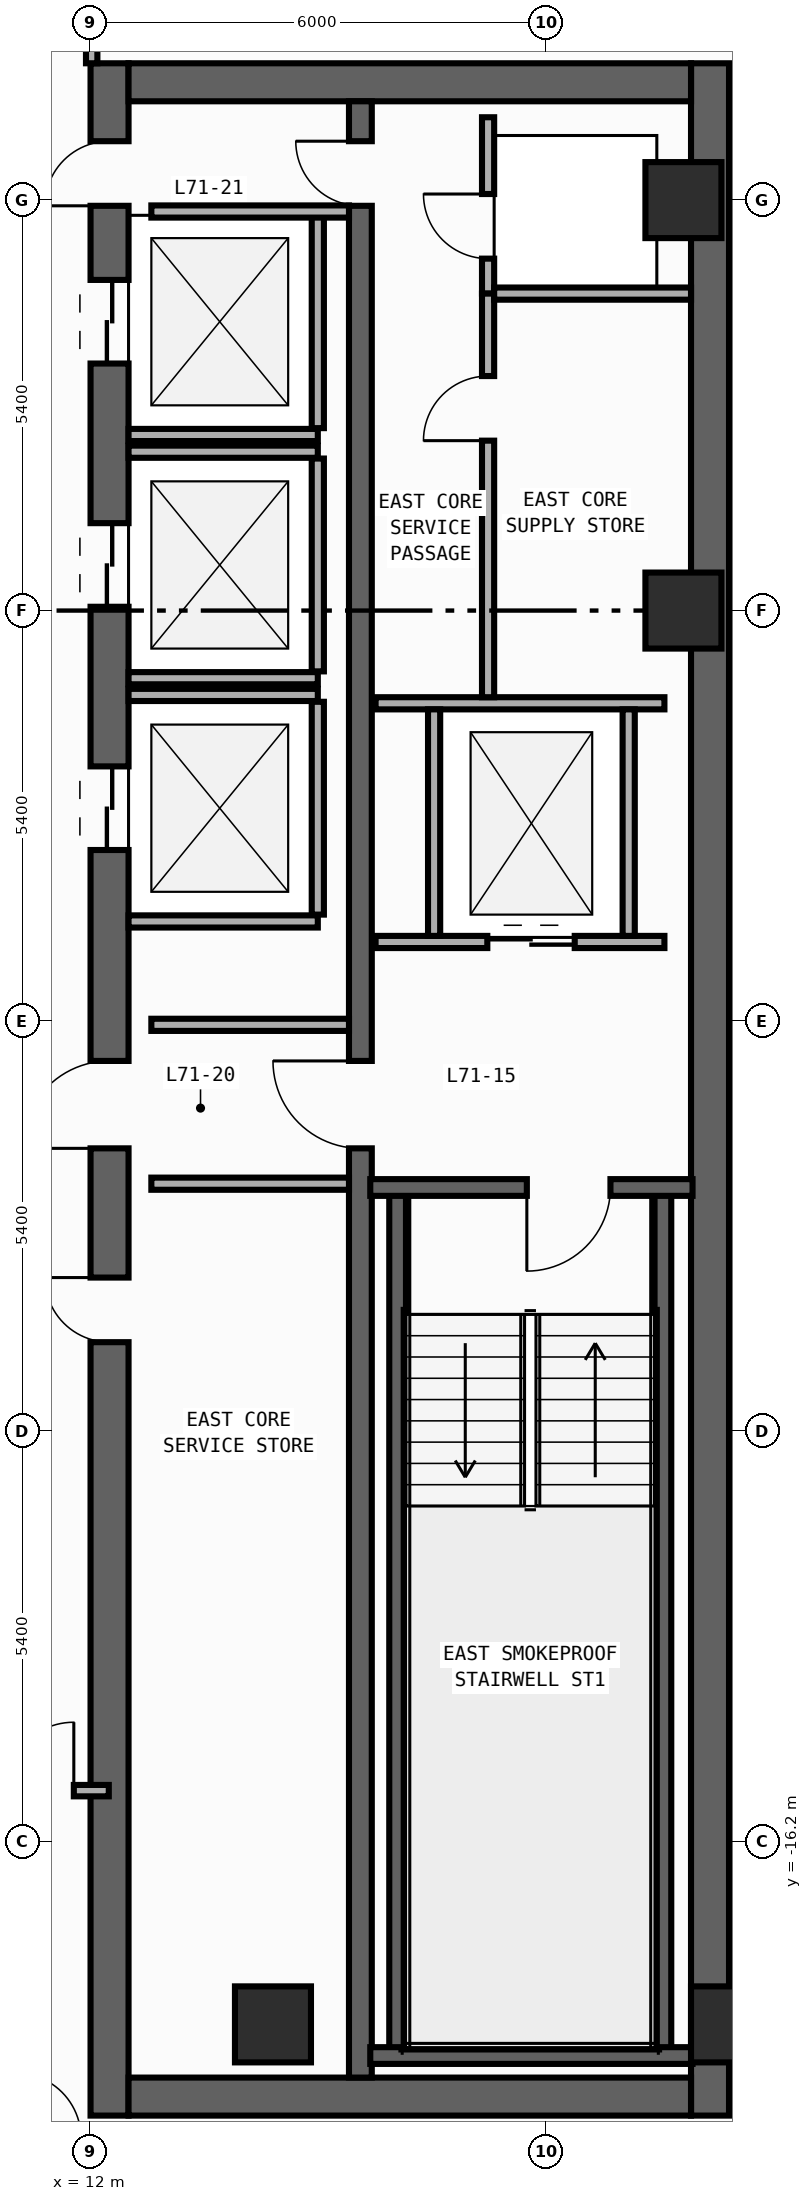
"""IFC4 building model, lengths in metres.
Left out: names, types, materials, properties, quantities, classifications, styles, units other than length and angle.
Written with IfcOpenShell. Run it as: python <this file> out.ifc"""

import sys

from ifc_helpers import new_model, si_unit, direction, frame, frame_2d, origin, origin_2d, place, context, subcontext, project, spatial, rectangle, circle, extrude, element, fill, save


model = new_model("IFC4")
c1 = context("Model", 3, precision=1e-05, world=origin(), true_north=direction((0.0, 1.0)))
c2 = subcontext(c1, "Body", "Model", "MODEL_VIEW")
j1 = project(units=[si_unit("LENGTHUNIT", "METRE"), si_unit("PLANEANGLEUNIT", "RADIAN")], contexts=[c1])
p1 = place(None, origin())
s1 = spatial("IfcSite", under=j1, at=p1, CompositionType="ELEMENT")
p2 = place(p1, origin())
s2 = spatial("IfcBuilding", under=s1, at=p2, CompositionType="ELEMENT")
p3 = place(p2, frame((0.0, 0.0, 296.6)))
s3 = spatial("IfcBuildingStorey", under=s2, at=p3, CompositionType="ELEMENT", Elevation=296.6)
p4 = place(p3, frame((12.25, -19.8, 0.0), z_axis=(0.0, 0.0, 1.0), x_axis=(0.0, 1.0, 0.0)))
e1 = element("IfcWall", 1, at=p4, inside=s3, PredefinedType="SHEAR", context=c2, shape_type="SweptSolid", body=[
    extrude(rectangle(XDim=27.0, YDim=0.5, at=frame_2d((13.5, 0.0))), origin(), (0.0, 0.0, 1.0), 3.54),
])
p5 = place(p4, frame((23.05, 0.0, 0.0)))
e2 = element("IfcOpeningElement", 2, at=p5, cuts=e1, PredefinedType="OPENING", context=c2, shape_type="SweptSolid", body=[
    extrude(rectangle(XDim=1.1, YDim=2.2, at=frame_2d((0.55, 1.1))), frame((0.0, 0.26, 0.0), z_axis=(0.0, -1.0, 0.0), x_axis=(1.0, 0.0, 0.0)), (0.0, 0.0, 1.0), 0.52),
])
p6 = place(p4, frame((19.85, 0.0, 0.0)))
e3 = element("IfcOpeningElement", 3, at=p6, cuts=e1, PredefinedType="OPENING", context=c2, shape_type="SweptSolid", body=[
    extrude(rectangle(XDim=1.1, YDim=2.2, at=frame_2d((0.55, 1.1))), frame((0.0, 0.26, 0.0), z_axis=(0.0, -1.0, 0.0), x_axis=(1.0, 0.0, 0.0)), (0.0, 0.0, 1.0), 0.52),
])
p7 = place(p4, frame((16.65, 0.0, 0.0)))
e4 = element("IfcOpeningElement", 4, at=p7, cuts=e1, PredefinedType="OPENING", context=c2, shape_type="SweptSolid", body=[
    extrude(rectangle(XDim=1.1, YDim=2.2, at=frame_2d((0.55, 1.1))), frame((0.0, 0.26, 0.0), z_axis=(0.0, -1.0, 0.0), x_axis=(1.0, 0.0, 0.0)), (0.0, 0.0, 1.0), 0.52),
])
p8 = place(p4, frame((10.175, 0.0, 0.0)))
e5 = element("IfcOpeningElement", 5, at=p8, cuts=e1, PredefinedType="OPENING", context=c2, shape_type="SweptSolid", body=[
    extrude(rectangle(XDim=0.85, YDim=2.1, at=frame_2d((0.425, 1.05))), frame((0.0, 0.26, 0.0), z_axis=(0.0, -1.0, 0.0), x_axis=(1.0, 0.0, 0.0)), (0.0, 0.0, 1.0), 0.52),
])
p9 = place(p4, frame((12.725, 0.0, 0.0)))
e6 = element("IfcOpeningElement", 6, at=p9, cuts=e1, PredefinedType="OPENING", context=c2, shape_type="SweptSolid", body=[
    extrude(rectangle(XDim=1.15, YDim=2.2, at=frame_2d((0.575, 1.1))), frame((0.0, 0.26, 0.0), z_axis=(0.0, -1.0, 0.0), x_axis=(1.0, 0.0, 0.0)), (0.0, 0.0, 1.0), 0.52),
])
p10 = place(p4, frame((25.125, 0.0, 0.0)))
e7 = element("IfcOpeningElement", 7, at=p10, cuts=e1, PredefinedType="OPENING", context=c2, shape_type="SweptSolid", body=[
    extrude(rectangle(XDim=0.85, YDim=2.1, at=frame_2d((0.425, 1.05))), frame((0.0, 0.26, 0.0), z_axis=(0.0, -1.0, 0.0), x_axis=(1.0, 0.0, 0.0)), (0.0, 0.0, 1.0), 0.52),
])
p11 = place(p3, frame((20.15, -19.8, 0.0), z_axis=(0.0, 0.0, 1.0), x_axis=(0.0, 1.0, 0.0)))
e8 = element("IfcWall", 8, at=p11, inside=s3, PredefinedType="SHEAR", context=c2, shape_type="SweptSolid", body=[
    extrude(rectangle(XDim=27.0, YDim=0.5, at=frame_2d((13.5, 0.0))), origin(), (0.0, 0.0, 1.0), 3.54),
])
for number, where, z_axis, x_axis in (
    (9, (12.5, -19.55, 0.0), (0.0, 0.0, 1.0), (1.0, 0.0, 0.0)),
    (10, (12.5, 6.95, 0.0), (0.0, 0.0, 1.0), (1.0, 0.0, 0.0)),
):
    element("IfcWall", number, at=place(p3, frame(where, z_axis=z_axis, x_axis=x_axis)), inside=s3, PredefinedType="SHEAR", context=c2, shape_type="SweptSolid", body=[
        extrude(rectangle(XDim=7.4, YDim=0.5, at=frame_2d((3.7, 0.0))), origin(), (0.0, 0.0, 1.0), 3.54),
    ])
p12 = place(p3, frame((15.55, -19.3, 0.0), z_axis=(0.0, 0.0, 1.0), x_axis=(0.0, 1.0, 0.0)))
e11 = element("IfcWall", 11, at=p12, inside=s3, PredefinedType="SHEAR", context=c2, shape_type="SweptSolid", body=[
    extrude(rectangle(XDim=26.0, YDim=0.3, at=frame_2d((13.0, 0.0))), origin(), (0.0, 0.0, 1.0), 3.54),
])
p13 = place(p12, frame((12.225, 0.0, 0.0)))
e12 = element("IfcOpeningElement", 12, at=p13, cuts=e11, PredefinedType="OPENING", context=c2, shape_type="SweptSolid", body=[
    extrude(rectangle(XDim=1.15, YDim=2.2, at=frame_2d((0.575, 1.1))), frame((0.0, 0.16, 0.0), z_axis=(0.0, -1.0, 0.0), x_axis=(1.0, 0.0, 0.0)), (0.0, 0.0, 1.0), 0.32),
])
p14 = place(p12, frame((24.625, 0.0, 0.0)))
e13 = element("IfcOpeningElement", 13, at=p14, cuts=e11, PredefinedType="OPENING", context=c2, shape_type="SweptSolid", body=[
    extrude(rectangle(XDim=0.85, YDim=2.1, at=frame_2d((0.425, 1.05))), frame((0.0, 0.16, 0.0), z_axis=(0.0, -1.0, 0.0), x_axis=(1.0, 0.0, 0.0)), (0.0, 0.0, 1.0), 0.32),
])
for number, where, z_axis, x_axis in (
    (14, (16.04, -19.01, 0.0), (0.0, 0.0, 1.0), (0.0, 1.0, 0.0)),
    (15, (19.53, -19.01, 0.0), (0.0, 0.0, 1.0), (0.0, 1.0, 0.0)),
):
    element("IfcWall", number, at=place(p3, frame(where, z_axis=z_axis, x_axis=x_axis)), inside=s3, PredefinedType="SHEAR", context=c2, shape_type="SweptSolid", body=[
        extrude(rectangle(XDim=11.42, YDim=0.22, at=frame_2d((5.71, 0.0))), origin(), (0.0, 0.0, 1.0), 3.54),
    ])
p15 = place(p3, frame((15.68, -19.01, 0.0), z_axis=(0.0, 0.0, 1.0), x_axis=(1.0, 0.0, 0.0)))
e16 = element("IfcWall", 16, at=p15, inside=s3, PredefinedType="SHEAR", context=c2, shape_type="SweptSolid", body=[
    extrude(rectangle(XDim=4.24, YDim=0.22, at=frame_2d((2.12, 0.0))), origin(), (0.0, 0.0, 1.0), 3.54),
])
p16 = place(p3, frame((19.92, -7.59, 0.0), z_axis=(0.0, 0.0, 1.0), x_axis=(-1.0, 0.0, 0.0)))
e17 = element("IfcWall", 17, at=p16, inside=s3, PredefinedType="SHEAR", context=c2, shape_type="SweptSolid", body=[
    extrude(rectangle(XDim=4.24, YDim=0.22, at=frame_2d((2.12, 0.0))), origin(), (0.0, 0.0, 1.0), 3.54),
])
p17 = place(p16, frame((1.08, 0.0, 0.0)))
e18 = element("IfcOpeningElement", 18, at=p17, cuts=e17, PredefinedType="OPENING", context=c2, shape_type="SweptSolid", body=[
    extrude(rectangle(XDim=1.1, YDim=2.2, at=frame_2d((0.55, 1.1))), frame((0.0, 0.12, 0.0), z_axis=(0.0, -1.0, 0.0), x_axis=(1.0, 0.0, 0.0)), (0.0, 0.0, 1.0), 0.24),
])
for number, where, z_axis, x_axis in (
    (19, (20.4, -18.6, 0.0), (0.0, 0.0, 1.0), (1.0, 0.0, 0.0)),
    (20, (14.4, -18.6, 0.0), (0.0, 0.0, 1.0), (1.0, 0.0, 0.0)),
    (21, (19.8, 0.0, 0.0), (0.0, 0.0, 1.0), (1.0, 0.0, 0.0)),
    (22, (19.8, 5.4, 0.0), (0.0, 0.0, 1.0), (1.0, 0.0, 0.0)),
):
    element("IfcColumn", number, at=place(p3, frame(where, z_axis=z_axis, x_axis=x_axis)), inside=s3, PredefinedType="COLUMN", context=c2, shape_type="SweptSolid", body=[
        extrude(circle(Radius=0.5, at=origin_2d()), origin(), (0.0, 0.0, 1.0), 3.8),
    ])
p18 = place(p3, frame((12.5, 2.31, 0.0), z_axis=(0.0, 0.0, 1.0), x_axis=(1.0, 0.0, 0.0)))
e23 = element("IfcWall", 23, at=p18, inside=s3, PredefinedType="STANDARD", context=c2, shape_type="SweptSolid", body=[
    extrude(rectangle(XDim=2.49, YDim=0.16, at=frame_2d((1.245, 0.0))), origin(), (0.0, 0.0, 1.0), 3.54),
])
p19 = place(p3, frame((14.99, 2.4, 0.0), z_axis=(0.0, 0.0, 1.0), x_axis=(0.0, 1.0, 0.0)))
e24 = element("IfcWall", 24, at=p19, inside=s3, PredefinedType="STANDARD", context=c2, shape_type="SweptSolid", body=[
    extrude(rectangle(XDim=2.8, YDim=0.16, at=frame_2d((1.4, 0.0))), origin(), (0.0, 0.0, 1.0), 3.54),
])
for number, where, z_axis, x_axis in (
    (25, (12.5, -0.89, 0.0), (0.0, 0.0, 1.0), (1.0, 0.0, 0.0)),
    (26, (12.5, 2.09, 0.0), (0.0, 0.0, 1.0), (1.0, 0.0, 0.0)),
):
    element("IfcWall", number, at=place(p3, frame(where, z_axis=z_axis, x_axis=x_axis)), inside=s3, PredefinedType="STANDARD", context=c2, shape_type="SweptSolid", body=[
        extrude(rectangle(XDim=2.49, YDim=0.16, at=frame_2d((1.245, 0.0))), origin(), (0.0, 0.0, 1.0), 3.54),
    ])
p20 = place(p3, frame((14.99, -0.8, 0.0), z_axis=(0.0, 0.0, 1.0), x_axis=(0.0, 1.0, 0.0)))
e27 = element("IfcWall", 27, at=p20, inside=s3, PredefinedType="STANDARD", context=c2, shape_type="SweptSolid", body=[
    extrude(rectangle(XDim=2.8, YDim=0.16, at=frame_2d((1.4, 0.0))), origin(), (0.0, 0.0, 1.0), 3.54),
])
for number, where, z_axis, x_axis in (
    (28, (12.5, -4.09, 0.0), (0.0, 0.0, 1.0), (1.0, 0.0, 0.0)),
    (29, (12.5, -1.11, 0.0), (0.0, 0.0, 1.0), (1.0, 0.0, 0.0)),
):
    element("IfcWall", number, at=place(p3, frame(where, z_axis=z_axis, x_axis=x_axis)), inside=s3, PredefinedType="STANDARD", context=c2, shape_type="SweptSolid", body=[
        extrude(rectangle(XDim=2.49, YDim=0.16, at=frame_2d((1.245, 0.0))), origin(), (0.0, 0.0, 1.0), 3.54),
    ])
p21 = place(p3, frame((14.99, -4.0, 0.0), z_axis=(0.0, 0.0, 1.0), x_axis=(0.0, 1.0, 0.0)))
e30 = element("IfcWall", 30, at=p21, inside=s3, PredefinedType="STANDARD", context=c2, shape_type="SweptSolid", body=[
    extrude(rectangle(XDim=2.8, YDim=0.16, at=frame_2d((1.4, 0.0))), origin(), (0.0, 0.0, 1.0), 3.54),
])
p22 = place(p3, frame((15.75, -4.36, 0.0), z_axis=(0.0, 0.0, 1.0), x_axis=(1.0, 0.0, 0.0)))
e31 = element("IfcWall", 31, at=p22, inside=s3, PredefinedType="STANDARD", context=c2, shape_type="SweptSolid", body=[
    extrude(rectangle(XDim=3.8, YDim=0.16, at=frame_2d((1.9, 0.0))), origin(), (0.0, 0.0, 1.0), 3.54),
])
p23 = place(p22, frame((1.47, 0.0, 0.0)))
e32 = element("IfcOpeningElement", 32, at=p23, cuts=e31, PredefinedType="OPENING", context=c2, shape_type="SweptSolid", body=[
    extrude(rectangle(XDim=1.15, YDim=2.2, at=frame_2d((0.575, 1.1))), frame((0.0, 0.09, 0.0), z_axis=(0.0, -1.0, 0.0), x_axis=(1.0, 0.0, 0.0)), (0.0, 0.0, 1.0), 0.18),
])
p24 = place(p3, frame((15.75, -1.22, 0.0), z_axis=(0.0, 0.0, 1.0), x_axis=(1.0, 0.0, 0.0)))
e33 = element("IfcWall", 33, at=p24, inside=s3, PredefinedType="STANDARD", context=c2, shape_type="SweptSolid", body=[
    extrude(rectangle(XDim=3.8, YDim=0.16, at=frame_2d((1.9, 0.0))), origin(), (0.0, 0.0, 1.0), 3.54),
])
for number, where, z_axis, x_axis in (
    (34, (16.52, -4.28, 0.0), (0.0, 0.0, 1.0), (0.0, 1.0, 0.0)),
    (35, (19.08, -4.28, 0.0), (0.0, 0.0, 1.0), (0.0, 1.0, 0.0)),
):
    element("IfcWall", number, at=place(p3, frame(where, z_axis=z_axis, x_axis=x_axis)), inside=s3, PredefinedType="STANDARD", context=c2, shape_type="SweptSolid", body=[
        extrude(rectangle(XDim=2.98, YDim=0.16, at=frame_2d((1.49, 0.0))), origin(), (0.0, 0.0, 1.0), 3.54),
    ])
for number, where, z_axis, x_axis in (
    (36, (12.8, -5.45, 0.0), (0.0, 0.0, 1.0), (1.0, 0.0, 0.0)),
    (37, (12.8, -7.54, 0.0), (0.0, 0.0, 1.0), (1.0, 0.0, 0.0)),
    (38, (12.8, 5.25, 0.0), (0.0, 0.0, 1.0), (1.0, 0.0, 0.0)),
):
    element("IfcWall", number, at=place(p3, frame(where, z_axis=z_axis, x_axis=x_axis)), inside=s3, PredefinedType="STANDARD", context=c2, shape_type="SweptSolid", body=[
        extrude(rectangle(XDim=2.6, YDim=0.16, at=frame_2d((1.3, 0.0))), origin(), (0.0, 0.0, 1.0), 3.54),
    ])
p25 = place(p3, frame((17.23, 4.17, 0.0), z_axis=(0.0, 0.0, 1.0), x_axis=(0.0, 1.0, 0.0)))
e39 = element("IfcWall", 39, at=p25, inside=s3, PredefinedType="PARTITIONING", context=c2, shape_type="SweptSolid", body=[
    extrude(rectangle(XDim=2.32, YDim=0.16, at=frame_2d((1.16, 0.0))), origin(), (0.0, 0.0, 1.0), 3.54),
])
p26 = place(p25, frame((0.46, 0.0, 0.0)))
e40 = element("IfcOpeningElement", 40, at=p26, cuts=e39, PredefinedType="OPENING", context=c2, shape_type="SweptSolid", body=[
    extrude(rectangle(XDim=0.85, YDim=2.1, at=frame_2d((0.425, 1.05))), frame((0.0, 0.09, 0.0), z_axis=(0.0, -1.0, 0.0), x_axis=(1.0, 0.0, 0.0)), (0.0, 0.0, 1.0), 0.18),
])
p27 = place(p3, frame((17.23, -1.14, 0.0), z_axis=(0.0, 0.0, 1.0), x_axis=(0.0, 1.0, 0.0)))
e41 = element("IfcWall", 41, at=p27, inside=s3, PredefinedType="PARTITIONING", context=c2, shape_type="SweptSolid", body=[
    extrude(rectangle(XDim=5.31, YDim=0.16, at=frame_2d((2.655, 0.0))), origin(), (0.0, 0.0, 1.0), 3.54),
])
p28 = place(p27, frame((3.375, 0.0, 0.0)))
e42 = element("IfcOpeningElement", 42, at=p28, cuts=e41, PredefinedType="OPENING", context=c2, shape_type="SweptSolid", body=[
    extrude(rectangle(XDim=0.85, YDim=2.1, at=frame_2d((0.425, 1.05))), frame((0.0, 0.09, 0.0), z_axis=(0.0, -1.0, 0.0), x_axis=(1.0, 0.0, 0.0)), (0.0, 0.0, 1.0), 0.18),
])
p29 = place(p3, frame((17.31, 4.17, 0.0), z_axis=(0.0, 0.0, 1.0), x_axis=(1.0, 0.0, 0.0)))
e43 = element("IfcWall", 43, at=p29, inside=s3, PredefinedType="PARTITIONING", context=c2, shape_type="SweptSolid", body=[
    extrude(rectangle(XDim=2.59, YDim=0.16, at=frame_2d((1.295, 0.0))), origin(), (0.0, 0.0, 1.0), 3.54),
])
p30 = place(p3, frame((12.015, 7.2, 0.0), z_axis=(0.0, 0.0, 1.0), x_axis=(0.0, 1.0, 0.0)))
e44 = element("IfcWall", 44, at=p30, inside=s3, PredefinedType="PARTITIONING", context=c2, shape_type="SweptSolid", body=[
    extrude(rectangle(XDim=6.68, YDim=0.15, at=frame_2d((3.34, 0.0))), origin(), (0.0, 0.0, 1.0), 3.54),
])
p31 = place(p30, frame((0.67, 0.0, 0.0)))
e45 = element("IfcOpeningElement", 45, at=p31, cuts=e44, PredefinedType="OPENING", context=c2, shape_type="SweptSolid", body=[
    extrude(rectangle(XDim=0.9, YDim=2.15, at=frame_2d((0.45, 1.075))), frame((0.0, 0.085, 0.0), z_axis=(0.0, -1.0, 0.0), x_axis=(1.0, 0.0, 0.0)), (0.0, 0.0, 1.0), 0.17),
])
p32 = place(p3, frame((1.19, -15.525, 0.0), z_axis=(0.0, 0.0, 1.0), x_axis=(1.0, 0.0, 0.0)))
e46 = element("IfcWall", 46, at=p32, inside=s3, PredefinedType="PARTITIONING", context=c2, shape_type="SweptSolid", body=[
    extrude(rectangle(XDim=11.05, YDim=0.15, at=frame_2d((5.525, 0.0))), origin(), (0.0, 0.0, 1.0), 3.54),
])
p33 = place(p32, frame((9.69, 0.0, 0.0)))
e47 = element("IfcOpeningElement", 47, at=p33, cuts=e46, PredefinedType="OPENING", context=c2, shape_type="SweptSolid", body=[
    extrude(rectangle(XDim=0.9, YDim=2.15, at=frame_2d((0.45, 1.075))), frame((0.0, 0.085, 0.0), z_axis=(0.0, -1.0, 0.0), x_axis=(1.0, 0.0, 0.0)), (0.0, 0.0, 1.0), 0.17),
])
p34 = place(p17, origin())
e48 = element("IfcDoor", 48, at=p34, inside=s3, OperationType="SINGLE_SWING_RIGHT", PredefinedType="DOOR", context=c2, shape_type="SweptSolid", body=[
    extrude(rectangle(XDim=1.1, YDim=2.2, at=frame_2d((0.55, 1.1))), frame((0.0, 0.025, 0.0), z_axis=(0.0, -1.0, 0.0), x_axis=(1.0, 0.0, 0.0)), (0.0, 0.0, 1.0), 0.05),
])
fill(e18, e48)
p35 = place(p5, origin())
e49 = element("IfcDoor", 49, at=p35, inside=s3, OperationType="DOUBLE_DOOR_SLIDING", PredefinedType="DOOR", context=c2, shape_type="SweptSolid", body=[
    extrude(rectangle(XDim=1.1, YDim=2.2, at=frame_2d((0.55, 1.1))), frame((0.0, 0.025, 0.0), z_axis=(0.0, -1.0, 0.0), x_axis=(1.0, 0.0, 0.0)), (0.0, 0.0, 1.0), 0.05),
])
fill(e2, e49)
p36 = place(p6, origin())
e50 = element("IfcDoor", 50, at=p36, inside=s3, OperationType="DOUBLE_DOOR_SLIDING", PredefinedType="DOOR", context=c2, shape_type="SweptSolid", body=[
    extrude(rectangle(XDim=1.1, YDim=2.2, at=frame_2d((0.55, 1.1))), frame((0.0, 0.025, 0.0), z_axis=(0.0, -1.0, 0.0), x_axis=(1.0, 0.0, 0.0)), (0.0, 0.0, 1.0), 0.05),
])
fill(e3, e50)
p37 = place(p7, origin())
e51 = element("IfcDoor", 51, at=p37, inside=s3, OperationType="DOUBLE_DOOR_SLIDING", PredefinedType="DOOR", context=c2, shape_type="SweptSolid", body=[
    extrude(rectangle(XDim=1.1, YDim=2.2, at=frame_2d((0.55, 1.1))), frame((0.0, 0.025, 0.0), z_axis=(0.0, -1.0, 0.0), x_axis=(1.0, 0.0, 0.0)), (0.0, 0.0, 1.0), 0.05),
])
fill(e4, e51)
p38 = place(p8, origin())
e52 = element("IfcDoor", 52, at=p38, inside=s3, OperationType="SINGLE_SWING_RIGHT", PredefinedType="DOOR", context=c2, shape_type="SweptSolid", body=[
    extrude(rectangle(XDim=0.85, YDim=2.1, at=frame_2d((0.425, 1.05))), frame((0.0, 0.025, 0.0), z_axis=(0.0, -1.0, 0.0), x_axis=(1.0, 0.0, 0.0)), (0.0, 0.0, 1.0), 0.05),
])
fill(e5, e52)
p39 = place(p9, origin())
e53 = element("IfcDoor", 53, at=p39, inside=s3, OperationType="SINGLE_SWING_LEFT", PredefinedType="DOOR", context=c2, shape_type="SweptSolid", body=[
    extrude(rectangle(XDim=1.15, YDim=2.2, at=frame_2d((0.575, 1.1))), frame((0.0, 0.025, 0.0), z_axis=(0.0, -1.0, 0.0), x_axis=(1.0, 0.0, 0.0)), (0.0, 0.0, 1.0), 0.05),
])
fill(e6, e53)
p40 = place(p13, origin())
e54 = element("IfcDoor", 54, at=p40, inside=s3, OperationType="SINGLE_SWING_RIGHT", PredefinedType="DOOR", context=c2, shape_type="SweptSolid", body=[
    extrude(rectangle(XDim=1.15, YDim=2.2, at=frame_2d((0.575, 1.1))), frame((0.0, 0.025, 0.0), z_axis=(0.0, -1.0, 0.0), x_axis=(1.0, 0.0, 0.0)), (0.0, 0.0, 1.0), 0.05),
])
fill(e12, e54)
p41 = place(p10, origin())
e55 = element("IfcDoor", 55, at=p41, inside=s3, OperationType="SINGLE_SWING_LEFT", PredefinedType="DOOR", context=c2, shape_type="SweptSolid", body=[
    extrude(rectangle(XDim=0.85, YDim=2.1, at=frame_2d((0.425, 1.05))), frame((0.0, 0.025, 0.0), z_axis=(0.0, -1.0, 0.0), x_axis=(1.0, 0.0, 0.0)), (0.0, 0.0, 1.0), 0.05),
])
fill(e7, e55)
p42 = place(p14, origin())
e56 = element("IfcDoor", 56, at=p42, inside=s3, OperationType="SINGLE_SWING_RIGHT", PredefinedType="DOOR", context=c2, shape_type="SweptSolid", body=[
    extrude(rectangle(XDim=0.85, YDim=2.1, at=frame_2d((0.425, 1.05))), frame((0.0, 0.025, 0.0), z_axis=(0.0, -1.0, 0.0), x_axis=(1.0, 0.0, 0.0)), (0.0, 0.0, 1.0), 0.05),
])
fill(e13, e56)
p43 = place(p23, origin())
e57 = element("IfcDoor", 57, at=p43, inside=s3, OperationType="DOUBLE_DOOR_SLIDING", PredefinedType="DOOR", context=c2, shape_type="SweptSolid", body=[
    extrude(rectangle(XDim=1.15, YDim=2.2, at=frame_2d((0.575, 1.1))), frame((0.0, 0.025, 0.0), z_axis=(0.0, -1.0, 0.0), x_axis=(1.0, 0.0, 0.0)), (0.0, 0.0, 1.0), 0.05),
])
fill(e32, e57)
p44 = place(p26, origin())
e58 = element("IfcDoor", 58, at=p44, inside=s3, OperationType="SINGLE_SWING_RIGHT", PredefinedType="DOOR", context=c2, shape_type="SweptSolid", body=[
    extrude(rectangle(XDim=0.85, YDim=2.1, at=frame_2d((0.425, 1.05))), frame((0.0, 0.025, 0.0), z_axis=(0.0, -1.0, 0.0), x_axis=(1.0, 0.0, 0.0)), (0.0, 0.0, 1.0), 0.05),
])
fill(e40, e58)
p45 = place(p28, origin())
e59 = element("IfcDoor", 59, at=p45, inside=s3, OperationType="SINGLE_SWING_LEFT", PredefinedType="DOOR", context=c2, shape_type="SweptSolid", body=[
    extrude(rectangle(XDim=0.85, YDim=2.1, at=frame_2d((0.425, 1.05))), frame((0.0, 0.025, 0.0), z_axis=(0.0, -1.0, 0.0), x_axis=(1.0, 0.0, 0.0)), (0.0, 0.0, 1.0), 0.05),
])
fill(e42, e59)
p46 = place(p33, origin())
e60 = element("IfcDoor", 60, at=p46, inside=s3, OperationType="SINGLE_SWING_RIGHT", PredefinedType="DOOR", context=c2, shape_type="SweptSolid", body=[
    extrude(rectangle(XDim=0.9, YDim=2.15, at=frame_2d((0.45, 1.075))), frame((0.0, 0.025, 0.0), z_axis=(0.0, -1.0, 0.0), x_axis=(1.0, 0.0, 0.0)), (0.0, 0.0, 1.0), 0.05),
])
fill(e47, e60)
save(model, sys.argv[1])
